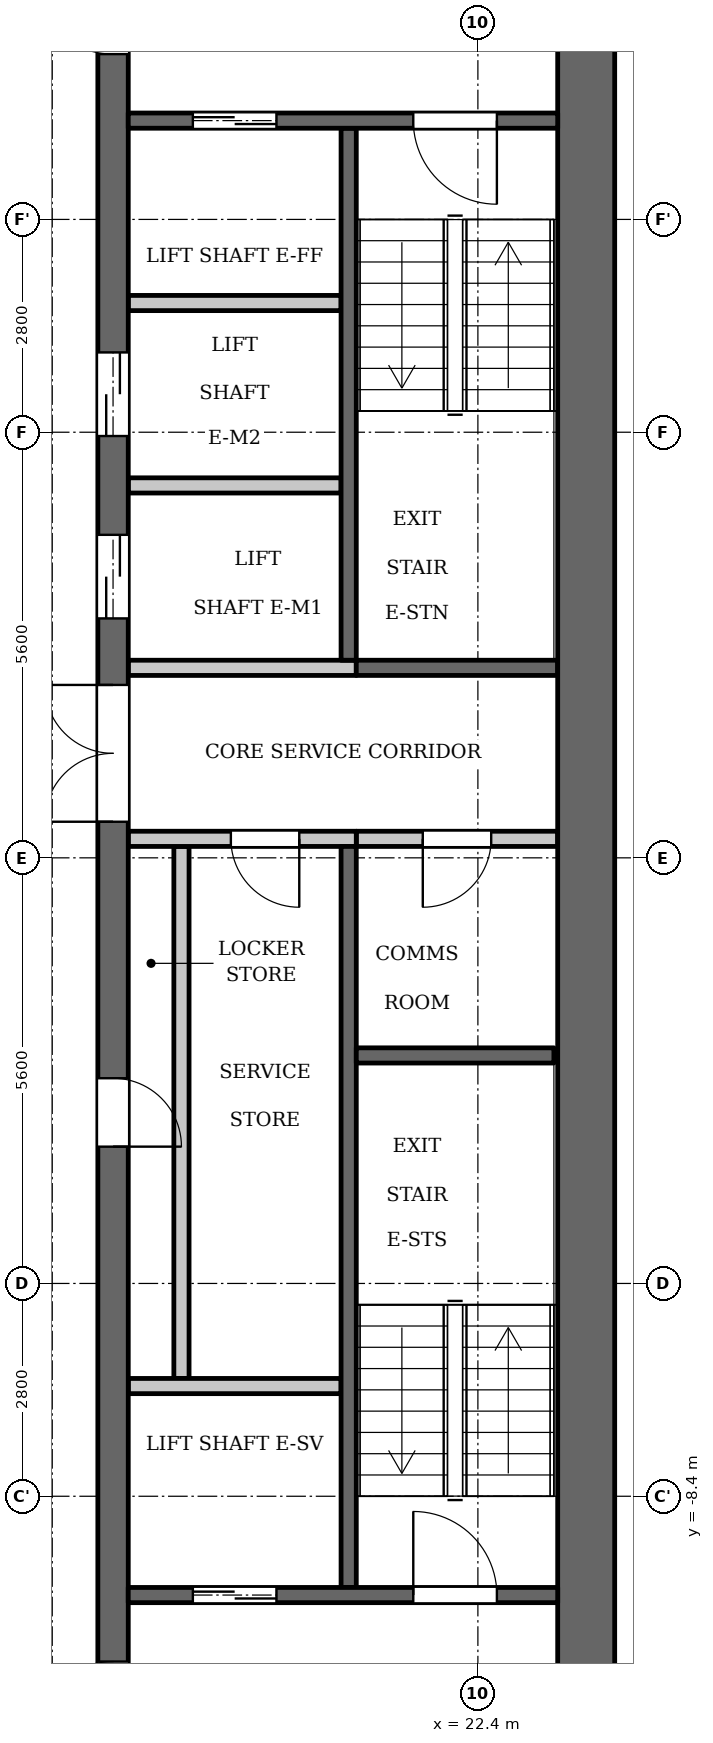
"""IFC4 building model, lengths in metres.
Left out: names, types, materials, properties, quantities, classifications, styles, units other than length and angle.
Written with IfcOpenShell. Run it as: python <this file> out.ifc"""

import sys

from ifc_helpers import new_model, si_unit, direction, frame, frame_2d, origin, place, context, subcontext, project, spatial, rectangle, extrude, element, fill, save


model = new_model("IFC4")
c1 = context("Model", 3, precision=1e-05, world=origin(), true_north=direction((0.0, 1.0)))
c2 = subcontext(c1, "Body", "Model", "MODEL_VIEW")
j1 = project(units=[si_unit("LENGTHUNIT", "METRE"), si_unit("PLANEANGLEUNIT", "RADIAN")], contexts=[c1])
p1 = place(None, origin())
s1 = spatial("IfcSite", under=j1, at=p1, CompositionType="ELEMENT")
p2 = place(p1, origin())
s2 = spatial("IfcBuilding", under=s1, at=p2, CompositionType="ELEMENT")
p3 = place(p2, frame((0.0, 0.0, 206.4)))
s3 = spatial("IfcBuildingStorey", under=s2, at=p3, CompositionType="ELEMENT", Elevation=206.4)
p4 = place(p3, frame((20.7, 2.6, 0.0), z_axis=(0.0, 0.0, 1.0), x_axis=(0.0, 1.0, 0.0)))
e1 = element("IfcWall", 1, at=p4, inside=s3, PredefinedType="SHEAR", context=c2, shape_type="SweptSolid", body=[
    extrude(rectangle(XDim=7.0, YDim=0.2, at=frame_2d((3.5, 0.0))), origin(), (0.0, 0.0, 1.0), 3.2),
])
p5 = place(p3, frame((20.7, -9.6, 0.0), z_axis=(0.0, 0.0, 1.0), x_axis=(0.0, 1.0, 0.0)))
e2 = element("IfcWall", 2, at=p5, inside=s3, PredefinedType="SHEAR", context=c2, shape_type="SweptSolid", body=[
    extrude(rectangle(XDim=9.75, YDim=0.2, at=frame_2d((4.875, 0.0))), origin(), (0.0, 0.0, 1.0), 3.2),
])
p6 = place(p3, frame((20.8, 2.5, 0.0), z_axis=(0.0, 0.0, 1.0), x_axis=(1.0, 0.0, 0.0)))
e3 = element("IfcWall", 3, at=p6, inside=s3, PredefinedType="SHEAR", context=c2, shape_type="SweptSolid", body=[
    extrude(rectangle(XDim=2.65, YDim=0.2, at=frame_2d((1.325, 0.0))), origin(), (0.0, 0.0, 1.0), 3.2),
])
p7 = place(p3, frame((20.8, 0.25, 0.0), z_axis=(0.0, 0.0, 1.0), x_axis=(1.0, 0.0, 0.0)))
e4 = element("IfcWall", 4, at=p7, inside=s3, PredefinedType="PARTITIONING", context=c2, shape_type="SweptSolid", body=[
    extrude(rectangle(XDim=2.65, YDim=0.2, at=frame_2d((1.325, 0.0))), origin(), (0.0, 0.0, 1.0), 3.2),
])
p8 = place(p7, frame((0.875, 0.0, 0.0)))
e5 = element("IfcOpeningElement", 5, at=p8, cuts=e4, PredefinedType="OPENING", context=c2, shape_type="SweptSolid", body=[
    extrude(rectangle(XDim=0.9, YDim=2.1, at=frame_2d((0.45, 1.05))), frame((0.0, 0.11, 0.0), z_axis=(0.0, -1.0, 0.0), x_axis=(1.0, 0.0, 0.0)), (0.0, 0.0, 1.0), 0.22),
])
p9 = place(p3, frame((18.5, -6.85, 0.0), z_axis=(0.0, 0.0, 1.0), x_axis=(0.0, 1.0, 0.0)))
e6 = element("IfcWall", 6, at=p9, inside=s3, PredefinedType="PARTITIONING", context=c2, shape_type="SweptSolid", body=[
    extrude(rectangle(XDim=7.0, YDim=0.2, at=frame_2d((3.5, 0.0))), origin(), (0.0, 0.0, 1.0), 3.2),
])
p10 = place(p3, frame((17.6, -12.45, 0.0), z_axis=(0.0, 0.0, 1.0), x_axis=(0.0, 1.0, 0.0)))
e7 = element("IfcWall", 7, at=p10, inside=s3, PredefinedType="SHEAR", context=c2, shape_type="SweptSolid", body=[
    extrude(rectangle(XDim=24.9, YDim=0.4, at=frame_2d((12.45, 0.0))), origin(), (0.0, 0.0, 1.0), 3.2),
])
p11 = place(p10, frame((8.65, 0.0, 0.0)))
e8 = element("IfcOpeningElement", 8, at=p11, cuts=e7, PredefinedType="OPENING", context=c2, shape_type="SweptSolid", body=[
    extrude(rectangle(XDim=0.9, YDim=2.1, at=frame_2d((0.45, 1.05))), frame((0.0, 0.21, 0.0), z_axis=(0.0, -1.0, 0.0), x_axis=(1.0, 0.0, 0.0)), (0.0, 0.0, 1.0), 0.42),
])
p12 = place(p10, frame((15.6, 0.0, 0.0)))
e9 = element("IfcOpeningElement", 9, at=p12, cuts=e7, PredefinedType="OPENING", context=c2, shape_type="SweptSolid", body=[
    extrude(rectangle(XDim=1.1, YDim=2.1, at=frame_2d((0.55, 1.05))), frame((0.0, 0.21, 0.0), z_axis=(0.0, -1.0, 0.0), x_axis=(1.0, 0.0, 0.0)), (0.0, 0.0, 1.0), 0.42),
])
p13 = place(p10, frame((18.0, 0.0, 0.0)))
e10 = element("IfcOpeningElement", 10, at=p13, cuts=e7, PredefinedType="OPENING", context=c2, shape_type="SweptSolid", body=[
    extrude(rectangle(XDim=1.1, YDim=2.1, at=frame_2d((0.55, 1.05))), frame((0.0, 0.21, 0.0), z_axis=(0.0, -1.0, 0.0), x_axis=(1.0, 0.0, 0.0)), (0.0, 0.0, 1.0), 0.42),
])
p14 = place(p10, frame((23.025, 0.0, 0.0)))
e11 = element("IfcOpeningElement", 11, at=p14, cuts=e7, PredefinedType="OPENING", context=c2, shape_type="SweptSolid", body=[
    extrude(rectangle(XDim=1.1, YDim=2.1, at=frame_2d((0.55, 1.05))), frame((0.0, 0.21, 0.0), z_axis=(0.0, -1.0, 0.0), x_axis=(1.0, 0.0, 0.0)), (0.0, 0.0, 1.0), 0.42),
])
p15 = place(p10, frame((0.775, 0.0, 0.0)))
e12 = element("IfcOpeningElement", 12, at=p15, cuts=e7, PredefinedType="OPENING", context=c2, shape_type="SweptSolid", body=[
    extrude(rectangle(XDim=1.1, YDim=2.1, at=frame_2d((0.55, 1.05))), frame((0.0, 0.21, 0.0), z_axis=(0.0, -1.0, 0.0), x_axis=(1.0, 0.0, 0.0)), (0.0, 0.0, 1.0), 0.42),
])
p16 = place(p10, frame((12.925, 0.0, 0.0)))
e13 = element("IfcOpeningElement", 13, at=p16, cuts=e7, PredefinedType="OPENING", context=c2, shape_type="SweptSolid", body=[
    extrude(rectangle(XDim=1.8, YDim=2.1, at=frame_2d((0.9, 1.05))), frame((0.0, 0.21, 0.0), z_axis=(0.0, -1.0, 0.0), x_axis=(1.0, 0.0, 0.0)), (0.0, 0.0, 1.0), 0.42),
])
p17 = place(p3, frame((23.825, -12.45, 0.0), z_axis=(0.0, 0.0, 1.0), x_axis=(0.0, 1.0, 0.0)))
e14 = element("IfcWall", 14, at=p17, inside=s3, PredefinedType="SHEAR", context=c2, shape_type="SweptSolid", body=[
    extrude(rectangle(XDim=24.9, YDim=0.75, at=frame_2d((12.45, 0.0))), origin(), (0.0, 0.0, 1.0), 3.2),
])
p18 = place(p3, frame((17.8, -9.7, 0.0), z_axis=(0.0, 0.0, 1.0), x_axis=(1.0, 0.0, 0.0)))
e15 = element("IfcWall", 15, at=p18, inside=s3, PredefinedType="SHEAR", context=c2, shape_type="SweptSolid", body=[
    extrude(rectangle(XDim=5.65, YDim=0.2, at=frame_2d((2.825, 0.0))), origin(), (0.0, 0.0, 1.0), 3.2),
])
p19 = place(p18, frame((0.85, 0.0, 0.0)))
e16 = element("IfcOpeningElement", 16, at=p19, cuts=e15, PredefinedType="OPENING", context=c2, shape_type="SweptSolid", body=[
    extrude(rectangle(XDim=1.1, YDim=2.1, at=frame_2d((0.55, 1.05))), frame((0.0, 0.11, 0.0), z_axis=(0.0, -1.0, 0.0), x_axis=(1.0, 0.0, 0.0)), (0.0, 0.0, 1.0), 0.22),
])
p20 = place(p18, frame((3.75, 0.0, 0.0)))
e17 = element("IfcOpeningElement", 17, at=p20, cuts=e15, PredefinedType="OPENING", context=c2, shape_type="SweptSolid", body=[
    extrude(rectangle(XDim=1.1, YDim=2.1, at=frame_2d((0.55, 1.05))), frame((0.0, 0.11, 0.0), z_axis=(0.0, -1.0, 0.0), x_axis=(1.0, 0.0, 0.0)), (0.0, 0.0, 1.0), 0.22),
])
p21 = place(p3, frame((17.8, -6.95, 0.0), z_axis=(0.0, 0.0, 1.0), x_axis=(1.0, 0.0, 0.0)))
e18 = element("IfcWall", 18, at=p21, inside=s3, PredefinedType="PARTITIONING", context=c2, shape_type="SweptSolid", body=[
    extrude(rectangle(XDim=2.8, YDim=0.2, at=frame_2d((1.4, 0.0))), origin(), (0.0, 0.0, 1.0), 3.2),
])
p22 = place(p3, frame((17.8, 0.25, 0.0), z_axis=(0.0, 0.0, 1.0), x_axis=(1.0, 0.0, 0.0)))
e19 = element("IfcWall", 19, at=p22, inside=s3, PredefinedType="PARTITIONING", context=c2, shape_type="SweptSolid", body=[
    extrude(rectangle(XDim=3.0, YDim=0.2, at=frame_2d((1.5, 0.0))), origin(), (0.0, 0.0, 1.0), 3.2),
])
p23 = place(p22, frame((1.35, 0.0, 0.0)))
e20 = element("IfcOpeningElement", 20, at=p23, cuts=e19, PredefinedType="OPENING", context=c2, shape_type="SweptSolid", body=[
    extrude(rectangle(XDim=0.9, YDim=2.1, at=frame_2d((0.45, 1.05))), frame((0.0, 0.11, 0.0), z_axis=(0.0, -1.0, 0.0), x_axis=(1.0, 0.0, 0.0)), (0.0, 0.0, 1.0), 0.22),
])
p24 = place(p3, frame((17.8, 2.5, 0.0), z_axis=(0.0, 0.0, 1.0), x_axis=(1.0, 0.0, 0.0)))
e21 = element("IfcWall", 21, at=p24, inside=s3, PredefinedType="PARTITIONING", context=c2, shape_type="SweptSolid", body=[
    extrude(rectangle(XDim=3.0, YDim=0.2, at=frame_2d((1.5, 0.0))), origin(), (0.0, 0.0, 1.0), 3.2),
])
for number, where, z_axis, x_axis in (
    (22, (17.8, 4.9, 0.0), (0.0, 0.0, 1.0), (1.0, 0.0, 0.0)),
    (23, (17.8, 7.3, 0.0), (0.0, 0.0, 1.0), (1.0, 0.0, 0.0)),
):
    element("IfcWall", number, at=place(p3, frame(where, z_axis=z_axis, x_axis=x_axis)), inside=s3, PredefinedType="PARTITIONING", context=c2, shape_type="SweptSolid", body=[
        extrude(rectangle(XDim=2.8, YDim=0.2, at=frame_2d((1.4, 0.0))), origin(), (0.0, 0.0, 1.0), 3.2),
    ])
p25 = place(p3, frame((17.8, 9.7, 0.0), z_axis=(0.0, 0.0, 1.0), x_axis=(1.0, 0.0, 0.0)))
e24 = element("IfcWall", 24, at=p25, inside=s3, PredefinedType="SHEAR", context=c2, shape_type="SweptSolid", body=[
    extrude(rectangle(XDim=5.65, YDim=0.2, at=frame_2d((2.825, 0.0))), origin(), (0.0, 0.0, 1.0), 3.2),
])
p26 = place(p25, frame((0.85, 0.0, 0.0)))
e25 = element("IfcOpeningElement", 25, at=p26, cuts=e24, PredefinedType="OPENING", context=c2, shape_type="SweptSolid", body=[
    extrude(rectangle(XDim=1.1, YDim=2.1, at=frame_2d((0.55, 1.05))), frame((0.0, 0.11, 0.0), z_axis=(0.0, -1.0, 0.0), x_axis=(1.0, 0.0, 0.0)), (0.0, 0.0, 1.0), 0.22),
])
p27 = place(p25, frame((3.75, 0.0, 0.0)))
e26 = element("IfcOpeningElement", 26, at=p27, cuts=e24, PredefinedType="OPENING", context=c2, shape_type="SweptSolid", body=[
    extrude(rectangle(XDim=1.1, YDim=2.1, at=frame_2d((0.55, 1.05))), frame((0.0, 0.11, 0.0), z_axis=(0.0, -1.0, 0.0), x_axis=(1.0, 0.0, 0.0)), (0.0, 0.0, 1.0), 0.22),
])
p28 = place(p3, frame((20.8, -2.6, 0.0), z_axis=(0.0, 0.0, 1.0), x_axis=(1.0, 0.0, 0.0)))
e27 = element("IfcWall", 27, at=p28, inside=s3, PredefinedType="SHEAR", context=c2, shape_type="SweptSolid", body=[
    extrude(rectangle(XDim=2.6, YDim=0.2, at=frame_2d((1.3, 0.0))), origin(), (0.0, 0.0, 1.0), 3.2),
])
p29 = place(p19, origin())
e28 = element("IfcDoor", 28, at=p29, inside=s3, OperationType="DOUBLE_DOOR_SLIDING", PredefinedType="DOOR", context=c2, shape_type="SweptSolid", body=[
    extrude(rectangle(XDim=1.1, YDim=2.1, at=frame_2d((0.55, 1.05))), frame((0.0, 0.025, 0.0), z_axis=(0.0, -1.0, 0.0), x_axis=(1.0, 0.0, 0.0)), (0.0, 0.0, 1.0), 0.05),
])
fill(e16, e28)
p30 = place(p11, origin())
e29 = element("IfcDoor", 29, at=p30, inside=s3, OperationType="SINGLE_SWING_LEFT", PredefinedType="DOOR", context=c2, shape_type="SweptSolid", body=[
    extrude(rectangle(XDim=0.9, YDim=2.1, at=frame_2d((0.45, 1.05))), frame((0.0, 0.025, 0.0), z_axis=(0.0, -1.0, 0.0), x_axis=(1.0, 0.0, 0.0)), (0.0, 0.0, 1.0), 0.05),
])
fill(e8, e29)
p31 = place(p23, origin())
e30 = element("IfcDoor", 30, at=p31, inside=s3, OperationType="SINGLE_SWING_RIGHT", PredefinedType="DOOR", context=c2, shape_type="SweptSolid", body=[
    extrude(rectangle(XDim=0.9, YDim=2.1, at=frame_2d((0.45, 1.05))), frame((0.0, 0.025, 0.0), z_axis=(0.0, -1.0, 0.0), x_axis=(1.0, 0.0, 0.0)), (0.0, 0.0, 1.0), 0.05),
])
fill(e20, e30)
p32 = place(p12, origin())
e31 = element("IfcDoor", 31, at=p32, inside=s3, OperationType="DOUBLE_DOOR_SLIDING", PredefinedType="DOOR", context=c2, shape_type="SweptSolid", body=[
    extrude(rectangle(XDim=1.1, YDim=2.1, at=frame_2d((0.55, 1.05))), frame((0.0, 0.025, 0.0), z_axis=(0.0, -1.0, 0.0), x_axis=(1.0, 0.0, 0.0)), (0.0, 0.0, 1.0), 0.05),
])
fill(e9, e31)
p33 = place(p13, origin())
e32 = element("IfcDoor", 32, at=p33, inside=s3, OperationType="DOUBLE_DOOR_SLIDING", PredefinedType="DOOR", context=c2, shape_type="SweptSolid", body=[
    extrude(rectangle(XDim=1.1, YDim=2.1, at=frame_2d((0.55, 1.05))), frame((0.0, 0.025, 0.0), z_axis=(0.0, -1.0, 0.0), x_axis=(1.0, 0.0, 0.0)), (0.0, 0.0, 1.0), 0.05),
])
fill(e10, e32)
p34 = place(p26, origin())
e33 = element("IfcDoor", 33, at=p34, inside=s3, OperationType="DOUBLE_DOOR_SLIDING", PredefinedType="DOOR", context=c2, shape_type="SweptSolid", body=[
    extrude(rectangle(XDim=1.1, YDim=2.1, at=frame_2d((0.55, 1.05))), frame((0.0, 0.025, 0.0), z_axis=(0.0, -1.0, 0.0), x_axis=(1.0, 0.0, 0.0)), (0.0, 0.0, 1.0), 0.05),
])
fill(e25, e33)
p35 = place(p14, origin())
e34 = element("IfcDoor", 34, at=p35, inside=s3, OperationType="SINGLE_SWING_LEFT", PredefinedType="DOOR", context=c2, shape_type="SweptSolid", body=[
    extrude(rectangle(XDim=1.1, YDim=2.1, at=frame_2d((0.55, 1.05))), frame((0.0, 0.025, 0.0), z_axis=(0.0, -1.0, 0.0), x_axis=(1.0, 0.0, 0.0)), (0.0, 0.0, 1.0), 0.05),
])
fill(e11, e34)
p36 = place(p15, origin())
e35 = element("IfcDoor", 35, at=p36, inside=s3, OperationType="SINGLE_SWING_RIGHT", PredefinedType="DOOR", context=c2, shape_type="SweptSolid", body=[
    extrude(rectangle(XDim=1.1, YDim=2.1, at=frame_2d((0.55, 1.05))), frame((0.0, 0.025, 0.0), z_axis=(0.0, -1.0, 0.0), x_axis=(1.0, 0.0, 0.0)), (0.0, 0.0, 1.0), 0.05),
])
fill(e12, e35)
p37 = place(p27, origin())
e36 = element("IfcDoor", 36, at=p37, inside=s3, OperationType="SINGLE_SWING_RIGHT", PredefinedType="DOOR", context=c2, shape_type="SweptSolid", body=[
    extrude(rectangle(XDim=1.1, YDim=2.1, at=frame_2d((0.55, 1.05))), frame((0.0, 0.025, 0.0), z_axis=(0.0, -1.0, 0.0), x_axis=(1.0, 0.0, 0.0)), (0.0, 0.0, 1.0), 0.05),
])
fill(e26, e36)
p38 = place(p20, origin())
e37 = element("IfcDoor", 37, at=p38, inside=s3, OperationType="SINGLE_SWING_RIGHT", PredefinedType="DOOR", context=c2, shape_type="SweptSolid", body=[
    extrude(rectangle(XDim=1.1, YDim=2.1, at=frame_2d((0.55, 1.05))), frame((0.0, 0.025, 0.0), z_axis=(0.0, -1.0, 0.0), x_axis=(1.0, 0.0, 0.0)), (0.0, 0.0, 1.0), 0.05),
])
fill(e17, e37)
p39 = place(p16, origin())
e38 = element("IfcDoor", 38, at=p39, inside=s3, OperationType="DOUBLE_DOOR_SINGLE_SWING", PredefinedType="DOOR", context=c2, shape_type="SweptSolid", body=[
    extrude(rectangle(XDim=1.8, YDim=2.1, at=frame_2d((0.9, 1.05))), frame((0.0, 0.025, 0.0), z_axis=(0.0, -1.0, 0.0), x_axis=(1.0, 0.0, 0.0)), (0.0, 0.0, 1.0), 0.05),
])
fill(e13, e38)
p40 = place(p8, origin())
e39 = element("IfcDoor", 39, at=p40, inside=s3, OperationType="SINGLE_SWING_LEFT", PredefinedType="DOOR", context=c2, shape_type="SweptSolid", body=[
    extrude(rectangle(XDim=0.9, YDim=2.1, at=frame_2d((0.45, 1.05))), frame((0.0, 0.025, 0.0), z_axis=(0.0, -1.0, 0.0), x_axis=(1.0, 0.0, 0.0)), (0.0, 0.0, 1.0), 0.05),
])
fill(e5, e39)
save(model, sys.argv[1])
